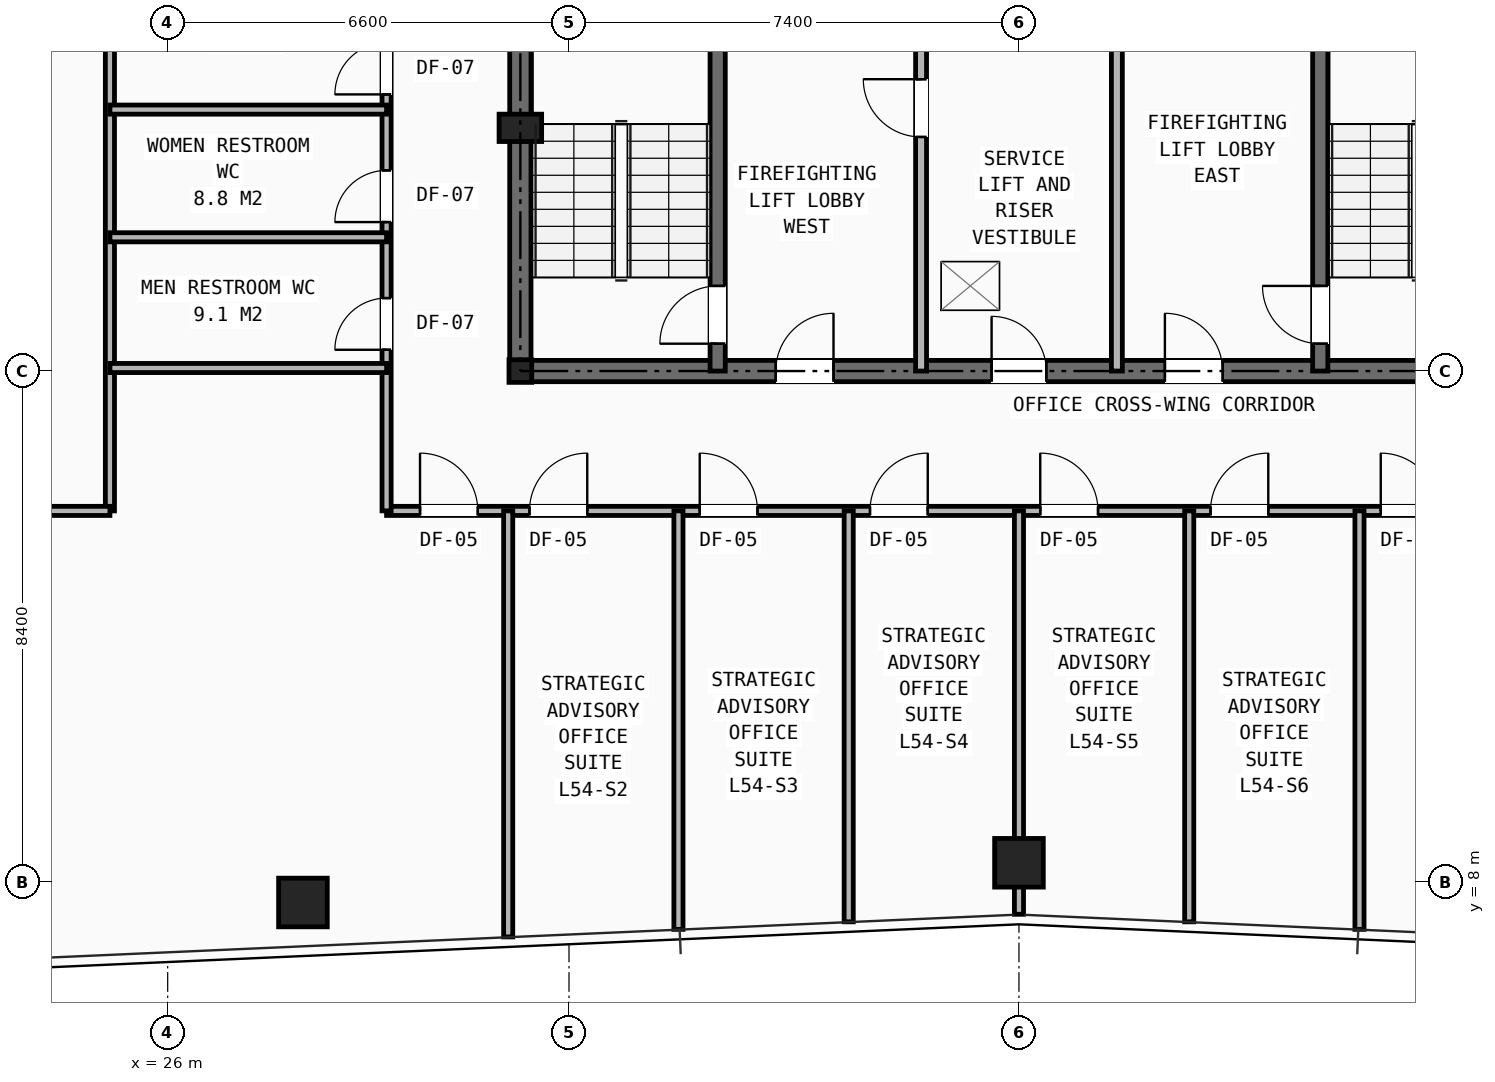
"""IFC4 building model, lengths in metres.
Left out: names, types, materials, properties, quantities, classifications, styles, units other than length and angle.
Written with IfcOpenShell. Run it as: python <this file> out.ifc"""

import sys

from ifc_helpers import new_model, si_unit, direction, frame, frame_2d, origin, origin_2d, place, context, subcontext, project, spatial, rectangle, hollow_rectangle, i_section, extrude, element, fill, save


model = new_model("IFC4")
c1 = context("Model", 3, precision=1e-05, world=origin(), true_north=direction((0.0, 1.0)))
c2 = subcontext(c1, "Body", "Model", "MODEL_VIEW")
j1 = project(units=[si_unit("LENGTHUNIT", "METRE"), si_unit("PLANEANGLEUNIT", "RADIAN")], contexts=[c1])
p1 = place(None, origin())
s1 = spatial("IfcSite", under=j1, at=p1, CompositionType="ELEMENT")
p2 = place(p1, origin())
s2 = spatial("IfcBuilding", under=s1, at=p2, CompositionType="ELEMENT")
p3 = place(p2, frame((0.0, 0.0, 189.6)))
s3 = spatial("IfcBuildingStorey", under=s2, at=p3, CompositionType="ELEMENT", Elevation=189.6)
p4 = place(p3, frame((31.8, 16.4, 0.0), z_axis=(0.0, 0.0, 1.0), x_axis=(1.0, 0.0, 0.0)))
e1 = element("IfcColumn", 1, at=p4, inside=s3, PredefinedType="COLUMN", context=c2, shape_type="SweptSolid", body=[
    extrude(i_section(OverallWidth=0.374, OverallDepth=0.372, WebThickness=0.016, FlangeThickness=0.026, at=origin_2d()), origin(), (0.0, 0.0, 1.0), 3.45),
])
p5 = place(p3, frame((31.8, 20.4, 0.0), z_axis=(0.0, 0.0, 1.0), x_axis=(1.0, 0.0, 0.0)))
e2 = element("IfcColumn", 2, at=p5, inside=s3, PredefinedType="PILASTER", context=c2, shape_type="SweptSolid", body=[
    extrude(rectangle(XDim=0.7, YDim=0.45, at=origin_2d()), origin(), (0.0, 0.0, 1.0), 3.45),
])
for number, where, z_axis, x_axis in (
    (3, (28.225, 7.659, 0.0), (0.0, 0.0, 1.0), (1.0, 0.0, 0.0)),
    (4, (40.0, 8.312, 0.0), (0.0, 0.0, 1.0), (1.0, 0.0, 0.0)),
):
    element("IfcColumn", number, at=place(p3, frame(where, z_axis=z_axis, x_axis=x_axis)), inside=s3, PredefinedType="COLUMN", context=c2, shape_type="SweptSolid", body=[
        extrude(hollow_rectangle(XDim=0.8, YDim=0.8, WallThickness=0.055, at=origin_2d()), origin(), (0.0, 0.0, 1.0), 3.45),
    ])
p6 = place(p3, frame((31.8, 16.4, 0.0), z_axis=(0.0, 0.0, 1.0), x_axis=(1.0, 0.0, 0.0)))
e5 = element("IfcWall", 5, at=p6, inside=s3, PredefinedType="SHEAR", context=c2, shape_type="SweptSolid", body=[
    extrude(rectangle(XDim=16.4, YDim=0.35, at=frame_2d((8.2, 0.0))), origin(), (0.0, 0.0, 1.0), 3.21),
])
p7 = place(p6, frame((7.75, 0.0, 0.0)))
e6 = element("IfcOpeningElement", 6, at=p7, cuts=e5, PredefinedType="OPENING", context=c2, shape_type="SweptSolid", body=[
    extrude(rectangle(XDim=0.9, YDim=2.1, at=frame_2d((0.45, 1.05))), frame((0.0, 0.185, 0.0), z_axis=(0.0, -1.0, 0.0), x_axis=(1.0, 0.0, 0.0)), (0.0, 0.0, 1.0), 0.37),
])
p8 = place(p6, frame((4.2, 0.0, 0.0)))
e7 = element("IfcOpeningElement", 7, at=p8, cuts=e5, PredefinedType="OPENING", context=c2, shape_type="SweptSolid", body=[
    extrude(rectangle(XDim=0.95, YDim=2.1, at=frame_2d((0.475, 1.05))), frame((0.0, 0.185, 0.0), z_axis=(0.0, -1.0, 0.0), x_axis=(1.0, 0.0, 0.0)), (0.0, 0.0, 1.0), 0.37),
])
p9 = place(p6, frame((10.6, 0.0, 0.0)))
e8 = element("IfcOpeningElement", 8, at=p9, cuts=e5, PredefinedType="OPENING", context=c2, shape_type="SweptSolid", body=[
    extrude(rectangle(XDim=0.95, YDim=2.1, at=frame_2d((0.475, 1.05))), frame((0.0, 0.185, 0.0), z_axis=(0.0, -1.0, 0.0), x_axis=(1.0, 0.0, 0.0)), (0.0, 0.0, 1.0), 0.37),
])
p10 = place(p3, frame((31.8, 16.4, 0.0), z_axis=(0.0, 0.0, 1.0), x_axis=(0.0, 1.0, 0.0)))
e9 = element("IfcWall", 9, at=p10, inside=s3, PredefinedType="SHEAR", context=c2, shape_type="SweptSolid", body=[
    extrude(rectangle(XDim=14.8, YDim=0.35, at=frame_2d((7.4, 0.0))), origin(), (0.0, 0.0, 1.0), 3.21),
])
p11 = place(p10, frame((11.0, 0.0, 0.0)))
e10 = element("IfcOpeningElement", 10, at=p11, cuts=e9, PredefinedType="OPENING", context=c2, shape_type="SweptSolid", body=[
    extrude(rectangle(XDim=1.1, YDim=2.15, at=frame_2d((0.55, 1.075))), frame((0.0, 0.185, 0.0), z_axis=(0.0, -1.0, 0.0), x_axis=(1.0, 0.0, 0.0)), (0.0, 0.0, 1.0), 0.37),
])
p12 = place(p3, frame((35.045, 16.4, 0.0), z_axis=(0.0, 0.0, 1.0), x_axis=(0.0, 1.0, 0.0)))
e11 = element("IfcWall", 11, at=p12, inside=s3, PredefinedType="SHEAR", context=c2, shape_type="SweptSolid", body=[
    extrude(rectangle(XDim=8.4, YDim=0.25, at=frame_2d((4.2, 0.0))), origin(), (0.0, 0.0, 1.0), 3.21),
])
p13 = place(p12, frame((0.45, 0.0, 0.0)))
e12 = element("IfcOpeningElement", 12, at=p13, cuts=e11, PredefinedType="OPENING", context=c2, shape_type="SweptSolid", body=[
    extrude(rectangle(XDim=0.95, YDim=2.1, at=frame_2d((0.475, 1.05))), frame((0.0, 0.135, 0.0), z_axis=(0.0, -1.0, 0.0), x_axis=(1.0, 0.0, 0.0)), (0.0, 0.0, 1.0), 0.27),
])
p14 = place(p3, frame((44.955, 16.4, 0.0), z_axis=(0.0, 0.0, 1.0), x_axis=(0.0, 1.0, 0.0)))
e13 = element("IfcWall", 13, at=p14, inside=s3, PredefinedType="SHEAR", context=c2, shape_type="SweptSolid", body=[
    extrude(rectangle(XDim=8.4, YDim=0.25, at=frame_2d((4.2, 0.0))), origin(), (0.0, 0.0, 1.0), 3.21),
])
p15 = place(p14, frame((0.45, 0.0, 0.0)))
e14 = element("IfcOpeningElement", 14, at=p15, cuts=e13, PredefinedType="OPENING", context=c2, shape_type="SweptSolid", body=[
    extrude(rectangle(XDim=0.95, YDim=2.1, at=frame_2d((0.475, 1.05))), frame((0.0, 0.135, 0.0), z_axis=(0.0, -1.0, 0.0), x_axis=(1.0, 0.0, 0.0)), (0.0, 0.0, 1.0), 0.27),
])
p16 = place(p3, frame((38.39, 16.4, 0.0), z_axis=(0.0, 0.0, 1.0), x_axis=(0.0, 1.0, 0.0)))
e15 = element("IfcWall", 15, at=p16, inside=s3, PredefinedType="PARTITIONING", context=c2, shape_type="SweptSolid", body=[
    extrude(rectangle(XDim=8.4, YDim=0.18, at=frame_2d((4.2, 0.0))), origin(), (0.0, 0.0, 1.0), 2.665),
])
p17 = place(p16, frame((3.85, 0.0, 0.0)))
e16 = element("IfcOpeningElement", 16, at=p17, cuts=e15, PredefinedType="OPENING", context=c2, shape_type="SweptSolid", body=[
    extrude(rectangle(XDim=0.95, YDim=2.1, at=frame_2d((0.475, 1.05))), frame((0.0, 0.1, 0.0), z_axis=(0.0, -1.0, 0.0), x_axis=(1.0, 0.0, 0.0)), (0.0, 0.0, 1.0), 0.2),
])
p18 = place(p3, frame((41.61, 16.4, 0.0), z_axis=(0.0, 0.0, 1.0), x_axis=(0.0, 1.0, 0.0)))
e17 = element("IfcWall", 17, at=p18, inside=s3, PredefinedType="PARTITIONING", context=c2, shape_type="SweptSolid", body=[
    extrude(rectangle(XDim=8.4, YDim=0.18, at=frame_2d((4.2, 0.0))), origin(), (0.0, 0.0, 1.0), 2.665),
])
p19 = place(p3, frame((29.6, 14.1, 0.0), z_axis=(0.0, 0.0, 1.0), x_axis=(1.0, 0.0, 0.0)))
e18 = element("IfcWall", 18, at=p19, inside=s3, PredefinedType="PARTITIONING", context=c2, shape_type="SweptSolid", body=[
    extrude(rectangle(XDim=18.6, YDim=0.15, at=frame_2d((9.3, 0.0))), origin(), (0.0, 0.0, 1.0), 2.225),
])
p20 = place(p19, frame((0.55, 0.0, 0.0)))
e19 = element("IfcOpeningElement", 19, at=p20, cuts=e18, PredefinedType="OPENING", context=c2, shape_type="SweptSolid", body=[
    extrude(rectangle(XDim=0.95, YDim=2.1, at=frame_2d((0.475, 1.05))), frame((0.0, 0.085, 0.0), z_axis=(0.0, -1.0, 0.0), x_axis=(1.0, 0.0, 0.0)), (0.0, 0.0, 1.0), 0.17),
])
p21 = place(p19, frame((2.35, 0.0, 0.0)))
e20 = element("IfcOpeningElement", 20, at=p21, cuts=e18, PredefinedType="OPENING", context=c2, shape_type="SweptSolid", body=[
    extrude(rectangle(XDim=0.95, YDim=2.1, at=frame_2d((0.475, 1.05))), frame((0.0, 0.085, 0.0), z_axis=(0.0, -1.0, 0.0), x_axis=(1.0, 0.0, 0.0)), (0.0, 0.0, 1.0), 0.17),
])
p22 = place(p19, frame((5.15, 0.0, 0.0)))
e21 = element("IfcOpeningElement", 21, at=p22, cuts=e18, PredefinedType="OPENING", context=c2, shape_type="SweptSolid", body=[
    extrude(rectangle(XDim=0.95, YDim=2.1, at=frame_2d((0.475, 1.05))), frame((0.0, 0.085, 0.0), z_axis=(0.0, -1.0, 0.0), x_axis=(1.0, 0.0, 0.0)), (0.0, 0.0, 1.0), 0.17),
])
p23 = place(p19, frame((7.95, 0.0, 0.0)))
e22 = element("IfcOpeningElement", 22, at=p23, cuts=e18, PredefinedType="OPENING", context=c2, shape_type="SweptSolid", body=[
    extrude(rectangle(XDim=0.95, YDim=2.1, at=frame_2d((0.475, 1.05))), frame((0.0, 0.085, 0.0), z_axis=(0.0, -1.0, 0.0), x_axis=(1.0, 0.0, 0.0)), (0.0, 0.0, 1.0), 0.17),
])
p24 = place(p19, frame((10.75, 0.0, 0.0)))
e23 = element("IfcOpeningElement", 23, at=p24, cuts=e18, PredefinedType="OPENING", context=c2, shape_type="SweptSolid", body=[
    extrude(rectangle(XDim=0.95, YDim=2.1, at=frame_2d((0.475, 1.05))), frame((0.0, 0.085, 0.0), z_axis=(0.0, -1.0, 0.0), x_axis=(1.0, 0.0, 0.0)), (0.0, 0.0, 1.0), 0.17),
])
p25 = place(p19, frame((13.55, 0.0, 0.0)))
e24 = element("IfcOpeningElement", 24, at=p25, cuts=e18, PredefinedType="OPENING", context=c2, shape_type="SweptSolid", body=[
    extrude(rectangle(XDim=0.95, YDim=2.1, at=frame_2d((0.475, 1.05))), frame((0.0, 0.085, 0.0), z_axis=(0.0, -1.0, 0.0), x_axis=(1.0, 0.0, 0.0)), (0.0, 0.0, 1.0), 0.17),
])
p26 = place(p19, frame((16.35, 0.0, 0.0)))
e25 = element("IfcOpeningElement", 25, at=p26, cuts=e18, PredefinedType="OPENING", context=c2, shape_type="SweptSolid", body=[
    extrude(rectangle(XDim=0.95, YDim=2.1, at=frame_2d((0.475, 1.05))), frame((0.0, 0.085, 0.0), z_axis=(0.0, -1.0, 0.0), x_axis=(1.0, 0.0, 0.0)), (0.0, 0.0, 1.0), 0.17),
])
p27 = place(p3, frame((29.6, 14.1, 0.0), z_axis=(0.0, 0.0, 1.0), x_axis=(0.0, 1.0, 0.0)))
e26 = element("IfcWall", 26, at=p27, inside=s3, PredefinedType="PARTITIONING", context=c2, shape_type="SweptSolid", body=[
    extrude(rectangle(XDim=8.7, YDim=0.15, at=frame_2d((4.35, 0.0))), origin(), (0.0, 0.0, 1.0), 3.21),
])
p28 = place(p27, frame((2.65, 0.0, 0.0)))
e27 = element("IfcOpeningElement", 27, at=p28, cuts=e26, PredefinedType="OPENING", context=c2, shape_type="SweptSolid", body=[
    extrude(rectangle(XDim=0.85, YDim=2.05, at=frame_2d((0.425, 1.025))), frame((0.0, 0.085, 0.0), z_axis=(0.0, -1.0, 0.0), x_axis=(1.0, 0.0, 0.0)), (0.0, 0.0, 1.0), 0.17),
])
p29 = place(p27, frame((4.75, 0.0, 0.0)))
e28 = element("IfcOpeningElement", 28, at=p29, cuts=e26, PredefinedType="OPENING", context=c2, shape_type="SweptSolid", body=[
    extrude(rectangle(XDim=0.85, YDim=2.05, at=frame_2d((0.425, 1.025))), frame((0.0, 0.085, 0.0), z_axis=(0.0, -1.0, 0.0), x_axis=(1.0, 0.0, 0.0)), (0.0, 0.0, 1.0), 0.17),
])
p30 = place(p27, frame((6.85, 0.0, 0.0)))
e29 = element("IfcOpeningElement", 29, at=p30, cuts=e26, PredefinedType="OPENING", context=c2, shape_type="SweptSolid", body=[
    extrude(rectangle(XDim=0.85, YDim=2.05, at=frame_2d((0.425, 1.025))), frame((0.0, 0.085, 0.0), z_axis=(0.0, -1.0, 0.0), x_axis=(1.0, 0.0, 0.0)), (0.0, 0.0, 1.0), 0.17),
])
p31 = place(p3, frame((25.05, 14.1, 0.0), z_axis=(0.0, 0.0, 1.0), x_axis=(0.0, 1.0, 0.0)))
e30 = element("IfcWall", 30, at=p31, inside=s3, PredefinedType="PARTITIONING", context=c2, shape_type="SweptSolid", body=[
    extrude(rectangle(XDim=8.7, YDim=0.15, at=frame_2d((4.35, 0.0))), origin(), (0.0, 0.0, 1.0), 3.21),
])
for number, where, z_axis, x_axis in (
    (31, (25.05, 16.45, 0.0), (0.0, 0.0, 1.0), (1.0, 0.0, 0.0)),
    (32, (25.05, 18.6, 0.0), (0.0, 0.0, 1.0), (1.0, 0.0, 0.0)),
    (33, (25.05, 20.7, 0.0), (0.0, 0.0, 1.0), (1.0, 0.0, 0.0)),
):
    element("IfcWall", number, at=place(p3, frame(where, z_axis=z_axis, x_axis=x_axis)), inside=s3, PredefinedType="PARTITIONING", context=c2, shape_type="SweptSolid", body=[
        extrude(rectangle(XDim=4.55, YDim=0.15, at=frame_2d((2.275, 0.0))), origin(), (0.0, 0.0, 1.0), 3.21),
    ])
p32 = place(p3, frame((31.6, 7.093, 0.0), z_axis=(0.0, 0.0, 1.0), x_axis=(0.0, 1.0, 0.0)))
e34 = element("IfcWall", 34, at=p32, inside=s3, PredefinedType="PARTITIONING", context=c2, shape_type="SweptSolid", body=[
    extrude(rectangle(XDim=7.007, YDim=0.15, at=frame_2d((3.503, 0.0))), origin(), (0.0, 0.0, 1.0), 2.589),
])
p33 = place(p3, frame((34.4, 7.217, 0.0), z_axis=(0.0, 0.0, 1.0), x_axis=(0.0, 1.0, 0.0)))
e35 = element("IfcWall", 35, at=p33, inside=s3, PredefinedType="PARTITIONING", context=c2, shape_type="SweptSolid", body=[
    extrude(rectangle(XDim=6.883, YDim=0.15, at=frame_2d((3.441, 0.0))), origin(), (0.0, 0.0, 1.0), 2.225),
])
p34 = place(p3, frame((37.2, 7.342, 0.0), z_axis=(0.0, 0.0, 1.0), x_axis=(0.0, 1.0, 0.0)))
e36 = element("IfcWall", 36, at=p34, inside=s3, PredefinedType="PARTITIONING", context=c2, shape_type="SweptSolid", body=[
    extrude(rectangle(XDim=6.759, YDim=0.15, at=frame_2d((3.379, 0.0))), origin(), (0.0, 0.0, 1.0), 2.225),
])
p35 = place(p3, frame((40.0, 7.465, 0.0), z_axis=(0.0, 0.0, 1.0), x_axis=(0.0, 1.0, 0.0)))
e37 = element("IfcWall", 37, at=p35, inside=s3, PredefinedType="PARTITIONING", context=c2, shape_type="SweptSolid", body=[
    extrude(rectangle(XDim=6.635, YDim=0.15, at=frame_2d((3.317, 0.0))), origin(), (0.0, 0.0, 1.0), 2.225),
])
p36 = place(p3, frame((42.8, 7.342, 0.0), z_axis=(0.0, 0.0, 1.0), x_axis=(0.0, 1.0, 0.0)))
e38 = element("IfcWall", 38, at=p36, inside=s3, PredefinedType="PARTITIONING", context=c2, shape_type="SweptSolid", body=[
    extrude(rectangle(XDim=6.759, YDim=0.15, at=frame_2d((3.379, 0.0))), origin(), (0.0, 0.0, 1.0), 2.589),
])
p37 = place(p3, frame((45.6, 7.217, 0.0), z_axis=(0.0, 0.0, 1.0), x_axis=(0.0, 1.0, 0.0)))
e39 = element("IfcWall", 39, at=p37, inside=s3, PredefinedType="PARTITIONING", context=c2, shape_type="SweptSolid", body=[
    extrude(rectangle(XDim=6.883, YDim=0.15, at=frame_2d((3.441, 0.0))), origin(), (0.0, 0.0, 1.0), 2.589),
])
p38 = place(p3, frame((13.726, 14.1, 0.0), z_axis=(0.0, 0.0, 1.0), x_axis=(1.0, 0.0, 0.0)))
e40 = element("IfcWall", 40, at=p38, inside=s3, PredefinedType="PARTITIONING", context=c2, shape_type="SweptSolid", body=[
    extrude(rectangle(XDim=11.324, YDim=0.15, at=frame_2d((5.662, 0.0))), origin(), (0.0, 0.0, 1.0), 2.589),
])
p39 = place(p7, origin())
e41 = element("IfcDoor", 41, at=p39, inside=s3, OperationType="SINGLE_SWING_LEFT", PredefinedType="DOOR", context=c2, shape_type="SweptSolid", body=[
    extrude(rectangle(XDim=0.9, YDim=2.1, at=frame_2d((0.45, 1.05))), frame((0.0, 0.025, 0.0), z_axis=(0.0, -1.0, 0.0), x_axis=(1.0, 0.0, 0.0)), (0.0, 0.0, 1.0), 0.05),
])
fill(e6, e41)
p40 = place(p17, origin())
e42 = element("IfcDoor", 42, at=p40, inside=s3, OperationType="SINGLE_SWING_RIGHT", PredefinedType="DOOR", context=c2, shape_type="SweptSolid", body=[
    extrude(rectangle(XDim=0.95, YDim=2.1, at=frame_2d((0.475, 1.05))), frame((0.0, 0.025, 0.0), z_axis=(0.0, -1.0, 0.0), x_axis=(1.0, 0.0, 0.0)), (0.0, 0.0, 1.0), 0.05),
])
fill(e16, e42)
p41 = place(p13, origin())
e43 = element("IfcDoor", 43, at=p41, inside=s3, OperationType="SINGLE_SWING_LEFT", PredefinedType="DOOR", context=c2, shape_type="SweptSolid", body=[
    extrude(rectangle(XDim=0.95, YDim=2.1, at=frame_2d((0.475, 1.05))), frame((0.0, 0.025, 0.0), z_axis=(0.0, -1.0, 0.0), x_axis=(1.0, 0.0, 0.0)), (0.0, 0.0, 1.0), 0.05),
])
fill(e12, e43)
p42 = place(p15, origin())
e44 = element("IfcDoor", 44, at=p42, inside=s3, OperationType="SINGLE_SWING_RIGHT", PredefinedType="DOOR", context=c2, shape_type="SweptSolid", body=[
    extrude(rectangle(XDim=0.95, YDim=2.1, at=frame_2d((0.475, 1.05))), frame((0.0, 0.025, 0.0), z_axis=(0.0, -1.0, 0.0), x_axis=(1.0, 0.0, 0.0)), (0.0, 0.0, 1.0), 0.05),
])
fill(e14, e44)
p43 = place(p8, origin())
e45 = element("IfcDoor", 45, at=p43, inside=s3, OperationType="SINGLE_SWING_RIGHT", PredefinedType="DOOR", context=c2, shape_type="SweptSolid", body=[
    extrude(rectangle(XDim=0.95, YDim=2.1, at=frame_2d((0.475, 1.05))), frame((0.0, 0.025, 0.0), z_axis=(0.0, -1.0, 0.0), x_axis=(1.0, 0.0, 0.0)), (0.0, 0.0, 1.0), 0.05),
])
fill(e7, e45)
p44 = place(p9, origin())
e46 = element("IfcDoor", 46, at=p44, inside=s3, OperationType="SINGLE_SWING_LEFT", PredefinedType="DOOR", context=c2, shape_type="SweptSolid", body=[
    extrude(rectangle(XDim=0.95, YDim=2.1, at=frame_2d((0.475, 1.05))), frame((0.0, 0.025, 0.0), z_axis=(0.0, -1.0, 0.0), x_axis=(1.0, 0.0, 0.0)), (0.0, 0.0, 1.0), 0.05),
])
fill(e8, e46)
p45 = place(p28, origin())
e47 = element("IfcDoor", 47, at=p45, inside=s3, OperationType="SINGLE_SWING_LEFT", PredefinedType="DOOR", context=c2, shape_type="SweptSolid", body=[
    extrude(rectangle(XDim=0.85, YDim=2.05, at=frame_2d((0.425, 1.025))), frame((0.0, 0.025, 0.0), z_axis=(0.0, -1.0, 0.0), x_axis=(1.0, 0.0, 0.0)), (0.0, 0.0, 1.0), 0.05),
])
fill(e27, e47)
p46 = place(p29, origin())
e48 = element("IfcDoor", 48, at=p46, inside=s3, OperationType="SINGLE_SWING_LEFT", PredefinedType="DOOR", context=c2, shape_type="SweptSolid", body=[
    extrude(rectangle(XDim=0.85, YDim=2.05, at=frame_2d((0.425, 1.025))), frame((0.0, 0.025, 0.0), z_axis=(0.0, -1.0, 0.0), x_axis=(1.0, 0.0, 0.0)), (0.0, 0.0, 1.0), 0.05),
])
fill(e28, e48)
p47 = place(p30, origin())
e49 = element("IfcDoor", 49, at=p47, inside=s3, OperationType="SINGLE_SWING_LEFT", PredefinedType="DOOR", context=c2, shape_type="SweptSolid", body=[
    extrude(rectangle(XDim=0.85, YDim=2.05, at=frame_2d((0.425, 1.025))), frame((0.0, 0.025, 0.0), z_axis=(0.0, -1.0, 0.0), x_axis=(1.0, 0.0, 0.0)), (0.0, 0.0, 1.0), 0.05),
])
fill(e29, e49)
p48 = place(p20, origin())
e50 = element("IfcDoor", 50, at=p48, inside=s3, OperationType="SINGLE_SWING_LEFT", PredefinedType="DOOR", context=c2, shape_type="SweptSolid", body=[
    extrude(rectangle(XDim=0.95, YDim=2.1, at=frame_2d((0.475, 1.05))), frame((0.0, 0.025, 0.0), z_axis=(0.0, -1.0, 0.0), x_axis=(1.0, 0.0, 0.0)), (0.0, 0.0, 1.0), 0.05),
])
fill(e19, e50)
p49 = place(p21, origin())
e51 = element("IfcDoor", 51, at=p49, inside=s3, OperationType="SINGLE_SWING_RIGHT", PredefinedType="DOOR", context=c2, shape_type="SweptSolid", body=[
    extrude(rectangle(XDim=0.95, YDim=2.1, at=frame_2d((0.475, 1.05))), frame((0.0, 0.025, 0.0), z_axis=(0.0, -1.0, 0.0), x_axis=(1.0, 0.0, 0.0)), (0.0, 0.0, 1.0), 0.05),
])
fill(e20, e51)
p50 = place(p22, origin())
e52 = element("IfcDoor", 52, at=p50, inside=s3, OperationType="SINGLE_SWING_LEFT", PredefinedType="DOOR", context=c2, shape_type="SweptSolid", body=[
    extrude(rectangle(XDim=0.95, YDim=2.1, at=frame_2d((0.475, 1.05))), frame((0.0, 0.025, 0.0), z_axis=(0.0, -1.0, 0.0), x_axis=(1.0, 0.0, 0.0)), (0.0, 0.0, 1.0), 0.05),
])
fill(e21, e52)
p51 = place(p23, origin())
e53 = element("IfcDoor", 53, at=p51, inside=s3, OperationType="SINGLE_SWING_RIGHT", PredefinedType="DOOR", context=c2, shape_type="SweptSolid", body=[
    extrude(rectangle(XDim=0.95, YDim=2.1, at=frame_2d((0.475, 1.05))), frame((0.0, 0.025, 0.0), z_axis=(0.0, -1.0, 0.0), x_axis=(1.0, 0.0, 0.0)), (0.0, 0.0, 1.0), 0.05),
])
fill(e22, e53)
p52 = place(p24, origin())
e54 = element("IfcDoor", 54, at=p52, inside=s3, OperationType="SINGLE_SWING_LEFT", PredefinedType="DOOR", context=c2, shape_type="SweptSolid", body=[
    extrude(rectangle(XDim=0.95, YDim=2.1, at=frame_2d((0.475, 1.05))), frame((0.0, 0.025, 0.0), z_axis=(0.0, -1.0, 0.0), x_axis=(1.0, 0.0, 0.0)), (0.0, 0.0, 1.0), 0.05),
])
fill(e23, e54)
p53 = place(p25, origin())
e55 = element("IfcDoor", 55, at=p53, inside=s3, OperationType="SINGLE_SWING_RIGHT", PredefinedType="DOOR", context=c2, shape_type="SweptSolid", body=[
    extrude(rectangle(XDim=0.95, YDim=2.1, at=frame_2d((0.475, 1.05))), frame((0.0, 0.025, 0.0), z_axis=(0.0, -1.0, 0.0), x_axis=(1.0, 0.0, 0.0)), (0.0, 0.0, 1.0), 0.05),
])
fill(e24, e55)
p54 = place(p26, origin())
e56 = element("IfcDoor", 56, at=p54, inside=s3, OperationType="SINGLE_SWING_LEFT", PredefinedType="DOOR", context=c2, shape_type="SweptSolid", body=[
    extrude(rectangle(XDim=0.95, YDim=2.1, at=frame_2d((0.475, 1.05))), frame((0.0, 0.025, 0.0), z_axis=(0.0, -1.0, 0.0), x_axis=(1.0, 0.0, 0.0)), (0.0, 0.0, 1.0), 0.05),
])
fill(e25, e56)
save(model, sys.argv[1])
